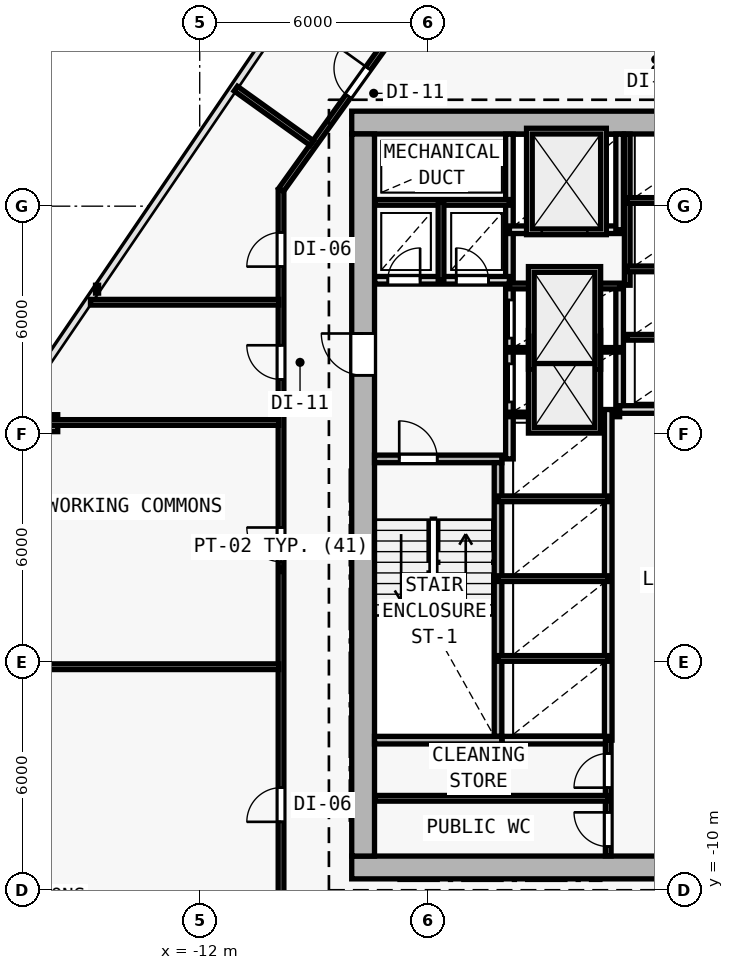
"""IFC4 building model, lengths in metres.
Left out: names, types, materials, properties, quantities, classifications, styles, units other than length and angle.
Written with IfcOpenShell. Run it as: python <this file> out.ifc"""

import sys

from ifc_helpers import new_model, si_unit, direction, frame, frame_2d, origin, origin_2d, place, context, subcontext, project, spatial, rectangle, i_section, extrude, element, fill, save


model = new_model("IFC4")
c1 = context("Model", 3, precision=1e-05, world=origin(), true_north=direction((0.0, 1.0)))
c2 = subcontext(c1, "Body", "Model", "MODEL_VIEW")
j1 = project(units=[si_unit("LENGTHUNIT", "METRE"), si_unit("PLANEANGLEUNIT", "RADIAN")], contexts=[c1])
p1 = place(None, origin())
s1 = spatial("IfcSite", under=j1, at=p1, CompositionType="ELEMENT")
p2 = place(p1, origin())
s2 = spatial("IfcBuilding", under=s1, at=p2, CompositionType="ELEMENT")
p3 = place(p2, frame((0.0, 0.0, 40.8)))
s3 = spatial("IfcBuildingStorey", under=s2, at=p3, CompositionType="ELEMENT", Elevation=40.8)
for number, where, z_axis, x_axis in (
    (1, (-7.7, -9.4, 0.0), (0.0, 0.0, 1.0), (1.0, 0.0, 0.0)),
    (2, (-7.7, 10.2, 0.0), (0.0, 0.0, 1.0), (1.0, 0.0, 0.0)),
    (3, (0.0, -9.4, 0.0), (0.0, 0.0, 1.0), (1.0, 0.0, 0.0)),
    (4, (-7.7, 2.0, 0.0), (0.0, 0.0, 1.0), (1.0, 0.0, 0.0)),
):
    element("IfcColumn", number, at=place(p3, frame(where, z_axis=z_axis, x_axis=x_axis)), inside=s3, PredefinedType="COLUMN", context=c2, shape_type="SweptSolid", body=[
        extrude(i_section(OverallWidth=0.416, OverallDepth=0.446, WebThickness=0.025, FlangeThickness=0.04, FilletRadius=0.015, at=origin_2d()), origin(), (0.0, 0.0, 1.0), 3.6),
    ])
p4 = place(p3, frame((-15.944, 2.291, 0.005), z_axis=(0.017478295015, 0.009793285923, 0.999799280233), x_axis=(-0.488810085697, 0.87239022239, 0.0)))
e5 = element("IfcColumn", 5, at=p4, inside=s3, PredefinedType="COLUMN", context=c2, shape_type="SweptSolid", body=[
    extrude(i_section(OverallWidth=0.416, OverallDepth=0.446, WebThickness=0.025, FlangeThickness=0.04, FilletRadius=0.015, at=origin_2d()), origin(), (0.0, 0.0, 1.0), 3.59),
])
p5 = place(p3, frame((-8.0, -9.4, 0.0), z_axis=(0.0, 0.0, 1.0), x_axis=(1.0, 0.0, 0.0)))
e6 = element("IfcWall", 6, at=p5, inside=s3, PredefinedType="SHEAR", context=c2, shape_type="SweptSolid", body=[
    extrude(rectangle(XDim=16.0, YDim=0.6, at=frame_2d((8.0, 0.0))), origin(), (0.0, 0.0, 1.0), 3.35),
])
p6 = place(p5, frame((9.65, 0.0, 0.0)))
e7 = element("IfcOpeningElement", 7, at=p6, cuts=e6, PredefinedType="OPENING", context=c2, shape_type="SweptSolid", body=[
    extrude(rectangle(XDim=1.5, YDim=2.2, at=frame_2d((0.75, 1.1))), frame((0.0, 0.31, 0.0), z_axis=(0.0, -1.0, 0.0), x_axis=(1.0, 0.0, 0.0)), (0.0, 0.0, 1.0), 0.62),
])
p7 = place(p3, frame((8.0, 10.2, 0.0), z_axis=(0.0, 0.0, 1.0), x_axis=(-1.0, 0.0, 0.0)))
e8 = element("IfcWall", 8, at=p7, inside=s3, PredefinedType="SHEAR", context=c2, shape_type="SweptSolid", body=[
    extrude(rectangle(XDim=16.0, YDim=0.6, at=frame_2d((8.0, 0.0))), origin(), (0.0, 0.0, 1.0), 3.35),
])
p8 = place(p7, frame((4.45, 0.0, 0.0)))
e9 = element("IfcOpeningElement", 9, at=p8, cuts=e8, PredefinedType="OPENING", context=c2, shape_type="SweptSolid", body=[
    extrude(rectangle(XDim=1.1, YDim=2.15, at=frame_2d((0.55, 1.075))), frame((0.0, 0.31, 0.0), z_axis=(0.0, -1.0, 0.0), x_axis=(1.0, 0.0, 0.0)), (0.0, 0.0, 1.0), 0.62),
])
p9 = place(p3, frame((-7.7, -9.1, 0.0), z_axis=(0.0, 0.0, 1.0), x_axis=(0.0, 1.0, 0.0)))
e10 = element("IfcWall", 10, at=p9, inside=s3, PredefinedType="SHEAR", context=c2, shape_type="SweptSolid", body=[
    extrude(rectangle(XDim=19.0, YDim=0.6, at=frame_2d((9.5, 0.0))), origin(), (0.0, 0.0, 1.0), 3.35),
])
p10 = place(p9, frame((12.65, 0.0, 0.0)))
e11 = element("IfcOpeningElement", 11, at=p10, cuts=e10, PredefinedType="OPENING", context=c2, shape_type="SweptSolid", body=[
    extrude(rectangle(XDim=1.1, YDim=2.15, at=frame_2d((0.55, 1.075))), frame((0.0, 0.31, 0.0), z_axis=(0.0, -1.0, 0.0), x_axis=(1.0, 0.0, 0.0)), (0.0, 0.0, 1.0), 0.62),
])
p11 = place(p3, frame((-7.4, 1.35, 0.0), z_axis=(0.0, 0.0, 1.0), x_axis=(1.0, 0.0, 0.0)))
e12 = element("IfcWall", 12, at=p11, inside=s3, PredefinedType="SOLIDWALL", context=c2, shape_type="SweptSolid", body=[
    extrude(rectangle(XDim=3.35, YDim=0.2, at=frame_2d((1.675, 0.0))), origin(), (0.0, 0.0, 1.0), 3.35),
])
p12 = place(p11, frame((0.65, 0.0, 0.0)))
e13 = element("IfcOpeningElement", 13, at=p12, cuts=e12, PredefinedType="OPENING", context=c2, shape_type="SweptSolid", body=[
    extrude(rectangle(XDim=1.0, YDim=2.15, at=frame_2d((0.5, 1.075))), frame((0.0, 0.11, 0.0), z_axis=(0.0, -1.0, 0.0), x_axis=(1.0, 0.0, 0.0)), (0.0, 0.0, 1.0), 0.22),
])
p13 = place(p3, frame((-4.15, -5.95, 0.0), z_axis=(0.0, 0.0, 1.0), x_axis=(0.0, 1.0, 0.0)))
e14 = element("IfcWall", 14, at=p13, inside=s3, PredefinedType="SOLIDWALL", context=c2, shape_type="SweptSolid", body=[
    extrude(rectangle(XDim=7.2, YDim=0.2, at=frame_2d((3.6, 0.0))), origin(), (0.0, 0.0, 1.0), 3.35),
])
p14 = place(p3, frame((-3.85, 1.35, 0.0), z_axis=(0.0, 0.0, 1.0), x_axis=(0.0, 1.0, 0.0)))
e15 = element("IfcWall", 15, at=p14, inside=s3, PredefinedType="SOLIDWALL", context=c2, shape_type="SweptSolid", body=[
    extrude(rectangle(XDim=8.545, YDim=0.2, at=frame_2d((4.272, 0.0))), origin(), (0.0, 0.0, 1.0), 3.35),
])
p15 = place(p14, frame((1.5, 0.0, 0.0)))
e16 = element("IfcOpeningElement", 16, at=p15, cuts=e15, PredefinedType="OPENING", context=c2, shape_type="SweptSolid", body=[
    extrude(rectangle(XDim=1.0, YDim=2.15, at=frame_2d((0.5, 1.075))), frame((0.0, 0.11, 0.0), z_axis=(0.0, -1.0, 0.0), x_axis=(1.0, 0.0, 0.0)), (0.0, 0.0, 1.0), 0.22),
])
p16 = place(p14, frame((3.18, 0.0, 0.0)))
e17 = element("IfcOpeningElement", 17, at=p16, cuts=e15, PredefinedType="OPENING", context=c2, shape_type="SweptSolid", body=[
    extrude(rectangle(XDim=1.0, YDim=2.15, at=frame_2d((0.5, 1.075))), frame((0.0, 0.11, 0.0), z_axis=(0.0, -1.0, 0.0), x_axis=(1.0, 0.0, 0.0)), (0.0, 0.0, 1.0), 0.22),
])
p17 = place(p3, frame((-7.395, 6.05, 0.0), z_axis=(0.0, 0.0, 1.0), x_axis=(1.0, 0.0, 0.0)))
e18 = element("IfcWall", 18, at=p17, inside=s3, PredefinedType="SOLIDWALL", context=c2, shape_type="SweptSolid", body=[
    extrude(rectangle(XDim=3.545, YDim=0.2, at=frame_2d((1.772, 0.0))), origin(), (0.0, 0.0, 1.0), 3.35),
])
p18 = place(p17, frame((0.345, 0.0, 0.0)))
e19 = element("IfcOpeningElement", 19, at=p18, cuts=e18, PredefinedType="OPENING", context=c2, shape_type="SweptSolid", body=[
    extrude(rectangle(XDim=0.85, YDim=2.1, at=frame_2d((0.425, 1.05))), frame((0.0, 0.11, 0.0), z_axis=(0.0, -1.0, 0.0), x_axis=(1.0, 0.0, 0.0)), (0.0, 0.0, 1.0), 0.22),
])
p19 = place(p17, frame((2.145, 0.0, 0.0)))
e20 = element("IfcOpeningElement", 20, at=p19, cuts=e18, PredefinedType="OPENING", context=c2, shape_type="SweptSolid", body=[
    extrude(rectangle(XDim=0.85, YDim=2.1, at=frame_2d((0.425, 1.05))), frame((0.0, 0.11, 0.0), z_axis=(0.0, -1.0, 0.0), x_axis=(1.0, 0.0, 0.0)), (0.0, 0.0, 1.0), 0.22),
])
p20 = place(p3, frame((-7.395, 8.1, 0.0), z_axis=(0.0, 0.0, 1.0), x_axis=(1.0, 0.0, 0.0)))
e21 = element("IfcWall", 21, at=p20, inside=s3, PredefinedType="PARTITIONING", context=c2, shape_type="SweptSolid", body=[
    extrude(rectangle(XDim=3.545, YDim=0.15, at=frame_2d((1.772, 0.0))), origin(), (0.0, 0.0, 1.0), 3.35),
])
p21 = place(p3, frame((-5.65, 6.05, 0.0), z_axis=(0.0, 0.0, 1.0), x_axis=(0.0, 1.0, 0.0)))
e22 = element("IfcWall", 22, at=p21, inside=s3, PredefinedType="PARTITIONING", context=c2, shape_type="SweptSolid", body=[
    extrude(rectangle(XDim=2.05, YDim=0.15, at=frame_2d((1.025, 0.0))), origin(), (0.0, 0.0, 1.0), 3.35),
])
p22 = place(p3, frame((-0.95, 2.65, 0.0), z_axis=(0.0, 0.0, 1.0), x_axis=(0.0, 1.0, 0.0)))
e23 = element("IfcWall", 23, at=p22, inside=s3, PredefinedType="SOLIDWALL", context=c2, shape_type="SweptSolid", body=[
    extrude(rectangle(XDim=3.27, YDim=0.2, at=frame_2d((1.635, 0.0))), origin(), (0.0, 0.0, 1.0), 3.35),
])
for number, where, z_axis, x_axis in (
    (24, (-3.85, 2.52, 0.0), (0.0, 0.0, 1.0), (1.0, 0.0, 0.0)),
    (25, (-3.85, 4.22, 0.0), (0.0, 0.0, 1.0), (1.0, 0.0, 0.0)),
):
    element("IfcWall", number, at=place(p3, frame(where, z_axis=z_axis, x_axis=x_axis)), inside=s3, PredefinedType="PARTITIONING", context=c2, shape_type="SweptSolid", body=[
        extrude(rectangle(XDim=2.9, YDim=0.12, at=frame_2d((1.45, 0.0))), origin(), (0.0, 0.0, 1.0), 3.35),
    ])
p23 = place(p3, frame((-3.85, 5.9, 0.0), z_axis=(0.0, 0.0, 1.0), x_axis=(1.0, 0.0, 0.0)))
e26 = element("IfcWall", 26, at=p23, inside=s3, PredefinedType="PARTITIONING", context=c2, shape_type="SweptSolid", body=[
    extrude(rectangle(XDim=2.9, YDim=0.15, at=frame_2d((1.45, 0.0))), origin(), (0.0, 0.0, 1.0), 3.35),
])
p24 = place(p3, frame((-3.85, 7.38, 0.0), z_axis=(0.0, 0.0, 1.0), x_axis=(1.0, 0.0, 0.0)))
e27 = element("IfcWall", 27, at=p24, inside=s3, PredefinedType="SOLIDWALL", context=c2, shape_type="SweptSolid", body=[
    extrude(rectangle(XDim=2.9, YDim=0.2, at=frame_2d((1.45, 0.0))), origin(), (0.0, 0.0, 1.0), 3.35),
])
p25 = place(p24, frame((0.85, 0.0, 0.0)))
e28 = element("IfcOpeningElement", 28, at=p25, cuts=e27, PredefinedType="OPENING", context=c2, shape_type="SweptSolid", body=[
    extrude(rectangle(XDim=1.2, YDim=2.2, at=frame_2d((0.6, 1.1))), frame((0.0, 0.11, 0.0), z_axis=(0.0, -1.0, 0.0), x_axis=(1.0, 0.0, 0.0)), (0.0, 0.0, 1.0), 0.22),
])
p26 = place(p3, frame((-0.95, 7.38, 0.0), z_axis=(0.0, 0.0, 1.0), x_axis=(0.0, 1.0, 0.0)))
e29 = element("IfcWall", 29, at=p26, inside=s3, PredefinedType="SOLIDWALL", context=c2, shape_type="SweptSolid", body=[
    extrude(rectangle(XDim=2.515, YDim=0.2, at=frame_2d((1.258, 0.0))), origin(), (0.0, 0.0, 1.0), 3.35),
])
p27 = place(p3, frame((-1.25, -6.05, 0.0), z_axis=(0.0, 0.0, 1.0), x_axis=(0.0, 1.0, 0.0)))
e30 = element("IfcWall", 30, at=p27, inside=s3, PredefinedType="SOLIDWALL", context=c2, shape_type="SweptSolid", body=[
    extrude(rectangle(XDim=8.7, YDim=0.2, at=frame_2d((4.35, 0.0))), origin(), (0.0, 0.0, 1.0), 3.35),
])
for number, where, z_axis, x_axis in (
    (31, (-4.15, -3.9, 0.0), (0.0, 0.0, 1.0), (1.0, 0.0, 0.0)),
    (32, (-4.15, -1.8, 0.0), (0.0, 0.0, 1.0), (1.0, 0.0, 0.0)),
    (33, (-4.15, 0.3, 0.0), (0.0, 0.0, 1.0), (1.0, 0.0, 0.0)),
):
    element("IfcWall", number, at=place(p3, frame(where, z_axis=z_axis, x_axis=x_axis)), inside=s3, PredefinedType="PARTITIONING", context=c2, shape_type="SweptSolid", body=[
        extrude(rectangle(XDim=2.9, YDim=0.15, at=frame_2d((1.45, 0.0))), origin(), (0.0, 0.0, 1.0), 3.35),
    ])
p28 = place(p3, frame((-0.95, 2.65, 0.0), z_axis=(0.0, 0.0, 1.0), x_axis=(1.0, 0.0, 0.0)))
e34 = element("IfcWall", 34, at=p28, inside=s3, PredefinedType="SOLIDWALL", context=c2, shape_type="SweptSolid", body=[
    extrude(rectangle(XDim=2.9, YDim=0.2, at=frame_2d((1.45, 0.0))), origin(), (0.0, 0.0, 1.0), 3.35),
])
p29 = place(p3, frame((-0.75, 5.92, 0.0), z_axis=(0.0, 0.0, 1.0), x_axis=(0.0, 1.0, 0.0)))
e35 = element("IfcWall", 35, at=p29, inside=s3, PredefinedType="PARTITIONING", context=c2, shape_type="SweptSolid", body=[
    extrude(rectangle(XDim=3.975, YDim=0.15, at=frame_2d((1.988, 0.0))), origin(), (0.0, 0.0, 1.0), 3.35),
])
for number, where, z_axis, x_axis in (
    (36, (-0.75, 4.55, 0.0), (0.0, 0.0, 1.0), (1.0, 0.0, 0.0)),
    (37, (-0.75, 6.35, 0.0), (0.0, 0.0, 1.0), (1.0, 0.0, 0.0)),
    (38, (-0.75, 8.15, 0.0), (0.0, 0.0, 1.0), (1.0, 0.0, 0.0)),
):
    element("IfcWall", number, at=place(p3, frame(where, z_axis=z_axis, x_axis=x_axis)), inside=s3, PredefinedType="PARTITIONING", context=c2, shape_type="SweptSolid", body=[
        extrude(rectangle(XDim=2.7, YDim=0.15, at=frame_2d((1.35, 0.0))), origin(), (0.0, 0.0, 1.0), 3.35),
    ])
p30 = place(p3, frame((-7.4, -6.05, 0.0), z_axis=(0.0, 0.0, 1.0), x_axis=(1.0, 0.0, 0.0)))
e39 = element("IfcWall", 39, at=p30, inside=s3, PredefinedType="SOLIDWALL", context=c2, shape_type="SweptSolid", body=[
    extrude(rectangle(XDim=3.35, YDim=0.2, at=frame_2d((1.675, 0.0))), origin(), (0.0, 0.0, 1.0), 3.35),
])
p31 = place(p3, frame((-4.04, -6.05, 0.0), z_axis=(0.0, 0.0, 1.0), x_axis=(1.0, 0.0, 0.0)))
e40 = element("IfcWall", 40, at=p31, inside=s3, PredefinedType="SOLIDWALL", context=c2, shape_type="SweptSolid", body=[
    extrude(rectangle(XDim=2.79, YDim=0.2, at=frame_2d((1.395, 0.0))), origin(), (0.0, 0.0, 1.0), 3.35),
])
p32 = place(p3, frame((-1.25, -9.095, 0.0), z_axis=(0.0, 0.0, 1.0), x_axis=(0.0, 1.0, 0.0)))
e41 = element("IfcWall", 41, at=p32, inside=s3, PredefinedType="PARTITIONING", context=c2, shape_type="SweptSolid", body=[
    extrude(rectangle(XDim=3.045, YDim=0.15, at=frame_2d((1.522, 0.0))), origin(), (0.0, 0.0, 1.0), 3.35),
])
p33 = place(p32, frame((1.795, 0.0, 0.0)))
e42 = element("IfcOpeningElement", 42, at=p33, cuts=e41, PredefinedType="OPENING", context=c2, shape_type="SweptSolid", body=[
    extrude(rectangle(XDim=0.9, YDim=2.1, at=frame_2d((0.45, 1.05))), frame((0.0, 0.085, 0.0), z_axis=(0.0, -1.0, 0.0), x_axis=(1.0, 0.0, 0.0)), (0.0, 0.0, 1.0), 0.17),
])
p34 = place(p32, frame((0.245, 0.0, 0.0)))
e43 = element("IfcOpeningElement", 43, at=p34, cuts=e41, PredefinedType="OPENING", context=c2, shape_type="SweptSolid", body=[
    extrude(rectangle(XDim=0.9, YDim=2.1, at=frame_2d((0.45, 1.05))), frame((0.0, 0.085, 0.0), z_axis=(0.0, -1.0, 0.0), x_axis=(1.0, 0.0, 0.0)), (0.0, 0.0, 1.0), 0.17),
])
p35 = place(p3, frame((-7.395, -7.58, 0.0), z_axis=(0.0, 0.0, 1.0), x_axis=(1.0, 0.0, 0.0)))
e44 = element("IfcWall", 44, at=p35, inside=s3, PredefinedType="PARTITIONING", context=c2, shape_type="SweptSolid", body=[
    extrude(rectangle(XDim=6.145, YDim=0.15, at=frame_2d((3.073, 0.0))), origin(), (0.0, 0.0, 1.0), 3.35),
])
p36 = place(p3, frame((-9.86, -11.56, 0.0), z_axis=(0.0, 0.0, 1.0), x_axis=(0.0, 1.0, 0.0)))
e45 = element("IfcWall", 45, at=p36, inside=s3, PredefinedType="PARTITIONING", context=c2, shape_type="SweptSolid", body=[
    extrude(rectangle(XDim=19.986, YDim=0.15, at=frame_2d((9.993, 0.0))), origin(), (0.0, 0.0, 1.0), 2.609),
])
p37 = place(p36, frame((10.205, 0.0, 0.0)))
e46 = element("IfcOpeningElement", 46, at=p37, cuts=e45, PredefinedType="OPENING", context=c2, shape_type="SweptSolid", body=[
    extrude(rectangle(XDim=0.9, YDim=2.1, at=frame_2d((0.45, 1.05))), frame((0.0, 0.085, 0.0), z_axis=(0.0, -1.0, 0.0), x_axis=(1.0, 0.0, 0.0)), (0.0, 0.0, 1.0), 0.17),
])
p38 = place(p36, frame((3.36, 0.0, 0.0)))
e47 = element("IfcOpeningElement", 47, at=p38, cuts=e45, PredefinedType="OPENING", context=c2, shape_type="SweptSolid", body=[
    extrude(rectangle(XDim=0.9, YDim=2.1, at=frame_2d((0.45, 1.05))), frame((0.0, 0.085, 0.0), z_axis=(0.0, -1.0, 0.0), x_axis=(1.0, 0.0, 0.0)), (0.0, 0.0, 1.0), 0.17),
])
p39 = place(p36, frame((17.97, 0.0, 0.0)))
e48 = element("IfcOpeningElement", 48, at=p39, cuts=e45, PredefinedType="OPENING", context=c2, shape_type="SweptSolid", body=[
    extrude(rectangle(XDim=0.9, YDim=2.1, at=frame_2d((0.45, 1.05))), frame((0.0, 0.085, 0.0), z_axis=(0.0, -1.0, 0.0), x_axis=(1.0, 0.0, 0.0)), (0.0, 0.0, 1.0), 0.17),
])
p40 = place(p36, frame((15.0, 0.0, 0.0)))
e49 = element("IfcOpeningElement", 49, at=p40, cuts=e45, PredefinedType="OPENING", context=c2, shape_type="SweptSolid", body=[
    extrude(rectangle(XDim=0.9, YDim=2.1, at=frame_2d((0.45, 1.05))), frame((0.0, 0.085, 0.0), z_axis=(0.0, -1.0, 0.0), x_axis=(1.0, 0.0, 0.0)), (0.0, 0.0, 1.0), 0.17),
])
p41 = place(p3, frame((-9.86, 8.426, 0.0), z_axis=(0.0, 0.0, 1.0), x_axis=(0.582449511476, 0.812866881218, 0.0)))
e50 = element("IfcWall", 50, at=p41, inside=s3, PredefinedType="PARTITIONING", context=c2, shape_type="SweptSolid", body=[
    extrude(rectangle(XDim=4.84, YDim=0.15, at=frame_2d((2.42, 0.0))), origin(), (0.0, 0.0, 1.0), 2.725),
])
p42 = place(p41, frame((3.038, 0.0, 0.0)))
e51 = element("IfcOpeningElement", 51, at=p42, cuts=e50, PredefinedType="OPENING", context=c2, shape_type="SweptSolid", body=[
    extrude(rectangle(XDim=0.9, YDim=2.1, at=frame_2d((0.45, 1.05))), frame((0.0, 0.085, 0.0), z_axis=(0.0, -1.0, 0.0), x_axis=(1.0, 0.0, 0.0)), (0.0, 0.0, 1.0), 0.17),
])
p43 = place(p3, frame((-9.92, 2.308, 0.0), z_axis=(0.0, 0.0, 1.0), x_axis=(-1.0, 0.0, 0.0)))
e52 = element("IfcWall", 52, at=p43, inside=s3, PredefinedType="PARTITIONING", context=c2, shape_type="SweptSolid", body=[
    extrude(rectangle(XDim=7.107, YDim=0.15, at=frame_2d((3.553, 0.0))), origin(), (0.0, 0.0, 1.0), 2.725),
])
p44 = place(p3, frame((-9.05, 9.659, 0.0), z_axis=(0.0, 0.0, 1.0), x_axis=(-0.812854692653, 0.582466521468, 0.0)))
e53 = element("IfcWall", 53, at=p44, inside=s3, PredefinedType="PARTITIONING", context=c2, shape_type="SweptSolid", body=[
    extrude(rectangle(XDim=2.462, YDim=0.15, at=frame_2d((1.231, 0.0))), origin(), (0.0, 0.0, 1.0), 2.735),
])
p45 = place(p3, frame((-9.92, -4.118, 0.0), z_axis=(0.0, 0.0, 1.0), x_axis=(-1.0, 0.0, 0.0)))
e54 = element("IfcWall", 54, at=p45, inside=s3, PredefinedType="PARTITIONING", context=c2, shape_type="SweptSolid", body=[
    extrude(rectangle(XDim=11.478, YDim=0.15, at=frame_2d((5.739, 0.0))), origin(), (0.0, 0.0, 1.0), 2.735),
])
p46 = place(p3, frame((-9.92, 5.472, 0.0), z_axis=(0.0, 0.0, 1.0), x_axis=(-1.0, 0.0, 0.0)))
e55 = element("IfcWall", 55, at=p46, inside=s3, PredefinedType="PARTITIONING", context=c2, shape_type="SweptSolid", body=[
    extrude(rectangle(XDim=4.954, YDim=0.15, at=frame_2d((2.477, 0.0))), origin(), (0.0, 0.0, 1.0), 2.735),
])
p47 = place(p10, origin())
e56 = element("IfcDoor", 56, at=p47, inside=s3, OperationType="SINGLE_SWING_RIGHT", PredefinedType="DOOR", context=c2, shape_type="SweptSolid", body=[
    extrude(rectangle(XDim=1.1, YDim=2.15, at=frame_2d((0.55, 1.075))), frame((0.0, 0.025, 0.0), z_axis=(0.0, -1.0, 0.0), x_axis=(1.0, 0.0, 0.0)), (0.0, 0.0, 1.0), 0.05),
])
fill(e11, e56)
p48 = place(p12, origin())
e57 = element("IfcDoor", 57, at=p48, inside=s3, OperationType="SINGLE_SWING_LEFT", PredefinedType="DOOR", context=c2, shape_type="SweptSolid", body=[
    extrude(rectangle(XDim=1.0, YDim=2.15, at=frame_2d((0.5, 1.075))), frame((0.0, 0.025, 0.0), z_axis=(0.0, -1.0, 0.0), x_axis=(1.0, 0.0, 0.0)), (0.0, 0.0, 1.0), 0.05),
])
fill(e13, e57)
p49 = place(p18, origin())
e58 = element("IfcDoor", 58, at=p49, inside=s3, OperationType="SINGLE_SWING_RIGHT", PredefinedType="DOOR", context=c2, shape_type="SweptSolid", body=[
    extrude(rectangle(XDim=0.85, YDim=2.1, at=frame_2d((0.425, 1.05))), frame((0.0, 0.025, 0.0), z_axis=(0.0, -1.0, 0.0), x_axis=(1.0, 0.0, 0.0)), (0.0, 0.0, 1.0), 0.05),
])
fill(e19, e58)
p50 = place(p19, origin())
e59 = element("IfcDoor", 59, at=p50, inside=s3, OperationType="SINGLE_SWING_LEFT", PredefinedType="DOOR", context=c2, shape_type="SweptSolid", body=[
    extrude(rectangle(XDim=0.85, YDim=2.1, at=frame_2d((0.425, 1.05))), frame((0.0, 0.025, 0.0), z_axis=(0.0, -1.0, 0.0), x_axis=(1.0, 0.0, 0.0)), (0.0, 0.0, 1.0), 0.05),
])
fill(e20, e59)
p51 = place(p25, origin())
e60 = element("IfcDoor", 60, at=p51, inside=s3, OperationType="DOUBLE_DOOR_SLIDING", PredefinedType="DOOR", context=c2, shape_type="SweptSolid", body=[
    extrude(rectangle(XDim=1.2, YDim=2.2, at=frame_2d((0.6, 1.1))), frame((0.0, 0.025, 0.0), z_axis=(0.0, -1.0, 0.0), x_axis=(1.0, 0.0, 0.0)), (0.0, 0.0, 1.0), 0.05),
])
fill(e28, e60)
p52 = place(p15, origin())
e61 = element("IfcDoor", 61, at=p52, inside=s3, OperationType="DOUBLE_DOOR_SLIDING", PredefinedType="DOOR", context=c2, shape_type="SweptSolid", body=[
    extrude(rectangle(XDim=1.0, YDim=2.15, at=frame_2d((0.5, 1.075))), frame((0.0, 0.025, 0.0), z_axis=(0.0, -1.0, 0.0), x_axis=(1.0, 0.0, 0.0)), (0.0, 0.0, 1.0), 0.05),
])
fill(e16, e61)
p53 = place(p16, origin())
e62 = element("IfcDoor", 62, at=p53, inside=s3, OperationType="DOUBLE_DOOR_SLIDING", PredefinedType="DOOR", context=c2, shape_type="SweptSolid", body=[
    extrude(rectangle(XDim=1.0, YDim=2.15, at=frame_2d((0.5, 1.075))), frame((0.0, 0.025, 0.0), z_axis=(0.0, -1.0, 0.0), x_axis=(1.0, 0.0, 0.0)), (0.0, 0.0, 1.0), 0.05),
])
fill(e17, e62)
p54 = place(p33, origin())
e63 = element("IfcDoor", 63, at=p54, inside=s3, OperationType="SINGLE_SWING_LEFT", PredefinedType="DOOR", context=c2, shape_type="SweptSolid", body=[
    extrude(rectangle(XDim=0.9, YDim=2.1, at=frame_2d((0.45, 1.05))), frame((0.0, 0.025, 0.0), z_axis=(0.0, -1.0, 0.0), x_axis=(1.0, 0.0, 0.0)), (0.0, 0.0, 1.0), 0.05),
])
fill(e42, e63)
p55 = place(p34, origin())
e64 = element("IfcDoor", 64, at=p55, inside=s3, OperationType="SINGLE_SWING_RIGHT", PredefinedType="DOOR", context=c2, shape_type="SweptSolid", body=[
    extrude(rectangle(XDim=0.9, YDim=2.1, at=frame_2d((0.45, 1.05))), frame((0.0, 0.025, 0.0), z_axis=(0.0, -1.0, 0.0), x_axis=(1.0, 0.0, 0.0)), (0.0, 0.0, 1.0), 0.05),
])
fill(e43, e64)
p56 = place(p37, origin())
e65 = element("IfcDoor", 65, at=p56, inside=s3, OperationType="SINGLE_SWING_RIGHT", PredefinedType="DOOR", context=c2, shape_type="SweptSolid", body=[
    extrude(rectangle(XDim=0.9, YDim=2.1, at=frame_2d((0.45, 1.05))), frame((0.0, 0.025, 0.0), z_axis=(0.0, -1.0, 0.0), x_axis=(1.0, 0.0, 0.0)), (0.0, 0.0, 1.0), 0.05),
])
fill(e46, e65)
p57 = place(p38, origin())
e66 = element("IfcDoor", 66, at=p57, inside=s3, OperationType="SINGLE_SWING_LEFT", PredefinedType="DOOR", context=c2, shape_type="SweptSolid", body=[
    extrude(rectangle(XDim=0.9, YDim=2.1, at=frame_2d((0.45, 1.05))), frame((0.0, 0.025, 0.0), z_axis=(0.0, -1.0, 0.0), x_axis=(1.0, 0.0, 0.0)), (0.0, 0.0, 1.0), 0.05),
])
fill(e47, e66)
p58 = place(p42, origin())
e67 = element("IfcDoor", 67, at=p58, inside=s3, OperationType="SINGLE_SWING_RIGHT", PredefinedType="DOOR", context=c2, shape_type="SweptSolid", body=[
    extrude(rectangle(XDim=0.9, YDim=2.1, at=frame_2d((0.45, 1.05))), frame((0.0, 0.025, 0.0), z_axis=(0.0, -1.0, 0.0), x_axis=(1.0, 0.0, 0.0)), (0.0, 0.0, 1.0), 0.05),
])
fill(e51, e67)
p59 = place(p39, origin())
e68 = element("IfcDoor", 68, at=p59, inside=s3, OperationType="SINGLE_SWING_LEFT", PredefinedType="DOOR", context=c2, shape_type="SweptSolid", body=[
    extrude(rectangle(XDim=0.9, YDim=2.1, at=frame_2d((0.45, 1.05))), frame((0.0, 0.025, 0.0), z_axis=(0.0, -1.0, 0.0), x_axis=(1.0, 0.0, 0.0)), (0.0, 0.0, 1.0), 0.05),
])
fill(e48, e68)
p60 = place(p40, origin())
e69 = element("IfcDoor", 69, at=p60, inside=s3, OperationType="SINGLE_SWING_RIGHT", PredefinedType="DOOR", context=c2, shape_type="SweptSolid", body=[
    extrude(rectangle(XDim=0.9, YDim=2.1, at=frame_2d((0.45, 1.05))), frame((0.0, 0.025, 0.0), z_axis=(0.0, -1.0, 0.0), x_axis=(1.0, 0.0, 0.0)), (0.0, 0.0, 1.0), 0.05),
])
fill(e49, e69)
save(model, sys.argv[1])
